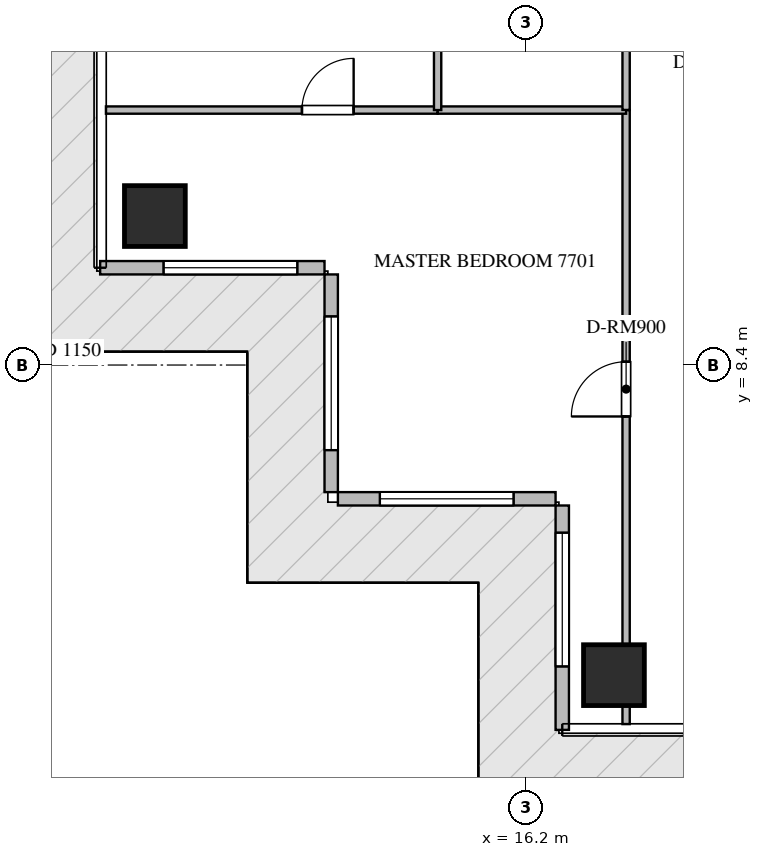
"""IFC4 building model, lengths in metres.
Left out: names, types, materials, properties, quantities, classifications, styles, units other than length and angle.
Written with IfcOpenShell. Run it as: python <this file> out.ifc"""

import sys

from ifc_helpers import new_model, si_unit, direction, frame, frame_2d, origin, origin_2d, place, context, subcontext, project, spatial, rectangle, extrude, source, transform, mapped, element, fill, save


model = new_model("IFC4")
c1 = context("Model", 3, precision=1e-05, world=origin(), true_north=direction((0.0, 1.0)))
c2 = subcontext(c1, "Body", "Model", "MODEL_VIEW")
j1 = project(units=[si_unit("LENGTHUNIT", "METRE"), si_unit("PLANEANGLEUNIT", "RADIAN")], contexts=[c1])
p1 = place(None, origin())
s1 = spatial("IfcSite", under=j1, at=p1, CompositionType="ELEMENT")
p2 = place(p1, origin())
s2 = spatial("IfcBuilding", under=s1, at=p2, CompositionType="ELEMENT")
p3 = place(p2, frame((0.0, 0.0, 309.65)))
s3 = spatial("IfcBuildingStorey", under=s2, at=p3, CompositionType="ELEMENT", Elevation=309.65)
m1 = source(origin(), c2, "Body", "SweptSolid", [
    extrude(rectangle(XDim=1.0, YDim=1.0, at=origin_2d()), origin(), (0.0, 0.0, 1.0), 4.05),
])
for number, where, z_axis, x_axis in (
    (1, (17.65, 3.3, -0.26), (0.0, 0.0, 1.0), (1.0, 0.0, 0.0)),
    (2, (10.1, 10.85, -0.26), (0.0, 0.0, 1.0), (1.0, 0.0, 0.0)),
):
    element("IfcColumn", number, at=place(p3, frame(where, z_axis=z_axis, x_axis=x_axis)), inside=s3, PredefinedType="COLUMN", context=c2, shape_type="MappedRepresentation", body=[
        mapped(m1, transform((0.0, 0.0, 0.0), scale=1.0)),
    ])
p4 = place(p3, frame((9.2, 10.0, 0.0), z_axis=(0.0, 0.0, 1.0), x_axis=(1.0, 0.0, 0.0)))
e3 = element("IfcWall", 3, at=p4, inside=s3, PredefinedType="ELEMENTEDWALL", context=c2, shape_type="SweptSolid", body=[
    extrude(rectangle(XDim=3.69, YDim=0.22, at=frame_2d((1.845, 0.0))), origin(), (0.0, 0.0, 1.0), 3.775),
])
p5 = place(p4, frame((1.043, 0.0, 0.65)))
e4 = element("IfcOpeningElement", 4, at=p5, cuts=e3, PredefinedType="OPENING", context=c2, shape_type="SweptSolid", body=[
    extrude(rectangle(XDim=2.2, YDim=2.4, at=frame_2d((1.1, 1.2))), frame((0.0, 0.12, 0.0), z_axis=(0.0, -1.0, 0.0), x_axis=(1.0, 0.0, 0.0)), (0.0, 0.0, 1.0), 0.24),
])
p6 = place(p3, frame((13.0, 9.89, 0.0), z_axis=(0.0, 0.0, 1.0), x_axis=(0.0, -1.0, 0.0)))
e5 = element("IfcWall", 5, at=p6, inside=s3, PredefinedType="ELEMENTEDWALL", context=c2, shape_type="SweptSolid", body=[
    extrude(rectangle(XDim=3.58, YDim=0.22, at=frame_2d((1.79, 0.0))), origin(), (0.0, 0.0, 1.0), 3.775),
])
p7 = place(p6, frame((0.69, 0.0, 0.65)))
e6 = element("IfcOpeningElement", 6, at=p7, cuts=e5, PredefinedType="OPENING", context=c2, shape_type="SweptSolid", body=[
    extrude(rectangle(XDim=2.2, YDim=2.4, at=frame_2d((1.1, 1.2))), frame((0.0, 0.12, 0.0), z_axis=(0.0, -1.0, 0.0), x_axis=(1.0, 0.0, 0.0)), (0.0, 0.0, 1.0), 0.24),
])
p8 = place(p3, frame((13.11, 6.2, 0.0), z_axis=(0.0, 0.0, 1.0), x_axis=(1.0, 0.0, 0.0)))
e7 = element("IfcWall", 7, at=p8, inside=s3, PredefinedType="ELEMENTEDWALL", context=c2, shape_type="SweptSolid", body=[
    extrude(rectangle(XDim=3.58, YDim=0.22, at=frame_2d((1.79, 0.0))), origin(), (0.0, 0.0, 1.0), 3.775),
])
p9 = place(p8, frame((0.69, 0.0, 0.65)))
e8 = element("IfcOpeningElement", 8, at=p9, cuts=e7, PredefinedType="OPENING", context=c2, shape_type="SweptSolid", body=[
    extrude(rectangle(XDim=2.2, YDim=2.4, at=frame_2d((1.1, 1.2))), frame((0.0, 0.12, 0.0), z_axis=(0.0, -1.0, 0.0), x_axis=(1.0, 0.0, 0.0)), (0.0, 0.0, 1.0), 0.24),
])
p10 = place(p3, frame((16.8, 6.09, 0.0), z_axis=(0.0, 0.0, 1.0), x_axis=(0.0, -1.0, 0.0)))
e9 = element("IfcWall", 9, at=p10, inside=s3, PredefinedType="ELEMENTEDWALL", context=c2, shape_type="SweptSolid", body=[
    extrude(rectangle(XDim=3.69, YDim=0.22, at=frame_2d((1.845, 0.0))), origin(), (0.0, 0.0, 1.0), 3.775),
])
p11 = place(p10, frame((0.447, 0.0, 0.65)))
e10 = element("IfcOpeningElement", 10, at=p11, cuts=e9, PredefinedType="OPENING", context=c2, shape_type="SweptSolid", body=[
    extrude(rectangle(XDim=2.2, YDim=2.4, at=frame_2d((1.1, 1.2))), frame((0.0, 0.12, 0.0), z_axis=(0.0, -1.0, 0.0), x_axis=(1.0, 0.0, 0.0)), (0.0, 0.0, 1.0), 0.24),
])
p12 = place(p3, frame((17.85, 2.495, 0.0), z_axis=(0.0, 0.0, 1.0), x_axis=(0.0, 1.0, 0.0)))
e11 = element("IfcWall", 11, at=p12, inside=s3, PredefinedType="PARTITIONING", context=c2, shape_type="SweptSolid", body=[
    extrude(rectangle(XDim=10.098, YDim=0.12, at=frame_2d((5.049, 0.0))), origin(), (0.0, 0.0, 1.0), 3.292),
])
p13 = place(p12, frame((5.059, 0.0, 0.0)))
e12 = element("IfcOpeningElement", 12, at=p13, cuts=e11, PredefinedType="OPENING", context=c2, shape_type="SweptSolid", body=[
    extrude(rectangle(XDim=0.9, YDim=2.1, at=frame_2d((0.45, 1.05))), frame((0.0, 0.07, 0.0), z_axis=(0.0, -1.0, 0.0), x_axis=(1.0, 0.0, 0.0)), (0.0, 0.0, 1.0), 0.14),
])
p14 = place(p3, frame((9.295, 12.593, 0.0), z_axis=(0.0, 0.0, 1.0), x_axis=(1.0, 0.0, 0.0)))
e13 = element("IfcWall", 13, at=p14, inside=s3, PredefinedType="PARTITIONING", context=c2, shape_type="SweptSolid", body=[
    extrude(rectangle(XDim=5.455, YDim=0.12, at=frame_2d((2.728, 0.0))), origin(), (0.0, 0.0, 1.0), 3.79),
])
p15 = place(p14, frame((3.224, 0.0, 0.0)))
e14 = element("IfcOpeningElement", 14, at=p15, cuts=e13, PredefinedType="OPENING", context=c2, shape_type="SweptSolid", body=[
    extrude(rectangle(XDim=0.85, YDim=2.1, at=frame_2d((0.425, 1.05))), frame((0.0, 0.07, 0.0), z_axis=(0.0, -1.0, 0.0), x_axis=(1.0, 0.0, 0.0)), (0.0, 0.0, 1.0), 0.14),
])
p16 = place(p3, frame((14.752, 12.593, 0.0), z_axis=(0.0, 0.0, 1.0), x_axis=(1.0, 0.0, 0.0)))
e15 = element("IfcWall", 15, at=p16, inside=s3, PredefinedType="PARTITIONING", context=c2, shape_type="SweptSolid", body=[
    extrude(rectangle(XDim=3.098, YDim=0.12, at=frame_2d((1.549, 0.0))), origin(), (0.0, 0.0, 1.0), 3.79),
])
p17 = place(p3, frame((14.75, 12.593, 0.0), z_axis=(0.0, 0.0, 1.0), x_axis=(0.0, 1.0, 0.0)))
e16 = element("IfcWall", 16, at=p17, inside=s3, PredefinedType="PARTITIONING", context=c2, shape_type="SweptSolid", body=[
    extrude(rectangle(XDim=4.267, YDim=0.12, at=frame_2d((2.134, 0.0))), origin(), (0.0, 0.0, 1.0), 3.79),
])
p18 = place(p3, frame((17.85, 12.595, 0.0), z_axis=(0.0, 0.0, 1.0), x_axis=(0.0, 1.0, 0.0)))
e17 = element("IfcWall", 17, at=p18, inside=s3, PredefinedType="PARTITIONING", context=c2, shape_type="SweptSolid", body=[
    extrude(rectangle(XDim=4.265, YDim=0.12, at=frame_2d((2.133, 0.0))), origin(), (0.0, 0.0, 1.0), 3.372),
])
p19 = place(p18, frame((1.847, 0.0, 0.0)))
e18 = element("IfcOpeningElement", 18, at=p19, cuts=e17, PredefinedType="OPENING", context=c2, shape_type="SweptSolid", body=[
    extrude(rectangle(XDim=0.85, YDim=2.1, at=frame_2d((0.425, 1.05))), frame((0.0, 0.07, 0.0), z_axis=(0.0, -1.0, 0.0), x_axis=(1.0, 0.0, 0.0)), (0.0, 0.0, 1.0), 0.14),
])
m2 = source(origin(), c2, "Body", "SweptSolid", [
    extrude(rectangle(XDim=2.2, YDim=2.4, at=frame_2d((1.1, 1.2))), frame((0.0, 0.03, 0.0), z_axis=(0.0, -1.0, 0.0), x_axis=(1.0, 0.0, 0.0)), (0.0, 0.0, 1.0), 0.06),
])
p20 = place(p5, origin())
e19 = element("IfcWindow", 19, at=p20, inside=s3, PartitioningType="SINGLE_PANEL", PredefinedType="WINDOW", context=c2, shape_type="MappedRepresentation", body=[
    mapped(m2, transform((0.0, 0.0, 0.0), scale=1.0)),
])
fill(e4, e19)
p21 = place(p7, origin())
e20 = element("IfcWindow", 20, at=p21, inside=s3, PartitioningType="SINGLE_PANEL", PredefinedType="WINDOW", context=c2, shape_type="MappedRepresentation", body=[
    mapped(m2, transform((0.0, 0.0, 0.0), scale=1.0)),
])
fill(e6, e20)
p22 = place(p9, origin())
e21 = element("IfcWindow", 21, at=p22, inside=s3, PartitioningType="SINGLE_PANEL", PredefinedType="WINDOW", context=c2, shape_type="MappedRepresentation", body=[
    mapped(m2, transform((0.0, 0.0, 0.0), scale=1.0)),
])
fill(e8, e21)
p23 = place(p11, origin())
e22 = element("IfcWindow", 22, at=p23, inside=s3, PartitioningType="SINGLE_PANEL", PredefinedType="WINDOW", context=c2, shape_type="MappedRepresentation", body=[
    mapped(m2, transform((0.0, 0.0, 0.0), scale=1.0)),
])
fill(e10, e22)
m3 = source(origin(), c2, "Body", "SweptSolid", [
    extrude(rectangle(XDim=0.9, YDim=2.1, at=frame_2d((0.45, 1.05))), frame((0.0, 0.025, 0.0), z_axis=(0.0, -1.0, 0.0), x_axis=(1.0, 0.0, 0.0)), (0.0, 0.0, 1.0), 0.05),
])
p24 = place(p13, origin())
e23 = element("IfcDoor", 23, at=p24, inside=s3, OperationType="SINGLE_SWING_LEFT", PredefinedType="DOOR", context=c2, shape_type="MappedRepresentation", body=[
    mapped(m3, transform((0.0, 0.0, 0.0), scale=1.0)),
])
fill(e12, e23)
m4 = source(origin(), c2, "Body", "SweptSolid", [
    extrude(rectangle(XDim=0.85, YDim=2.1, at=frame_2d((0.425, 1.05))), frame((0.0, 0.025, 0.0), z_axis=(0.0, -1.0, 0.0), x_axis=(1.0, 0.0, 0.0)), (0.0, 0.0, 1.0), 0.05),
])
p25 = place(p15, origin())
e24 = element("IfcDoor", 24, at=p25, inside=s3, OperationType="SINGLE_SWING_RIGHT", PredefinedType="DOOR", context=c2, shape_type="MappedRepresentation", body=[
    mapped(m4, transform((0.0, 0.0, 0.0), scale=1.0)),
])
fill(e14, e24)
save(model, sys.argv[1])
